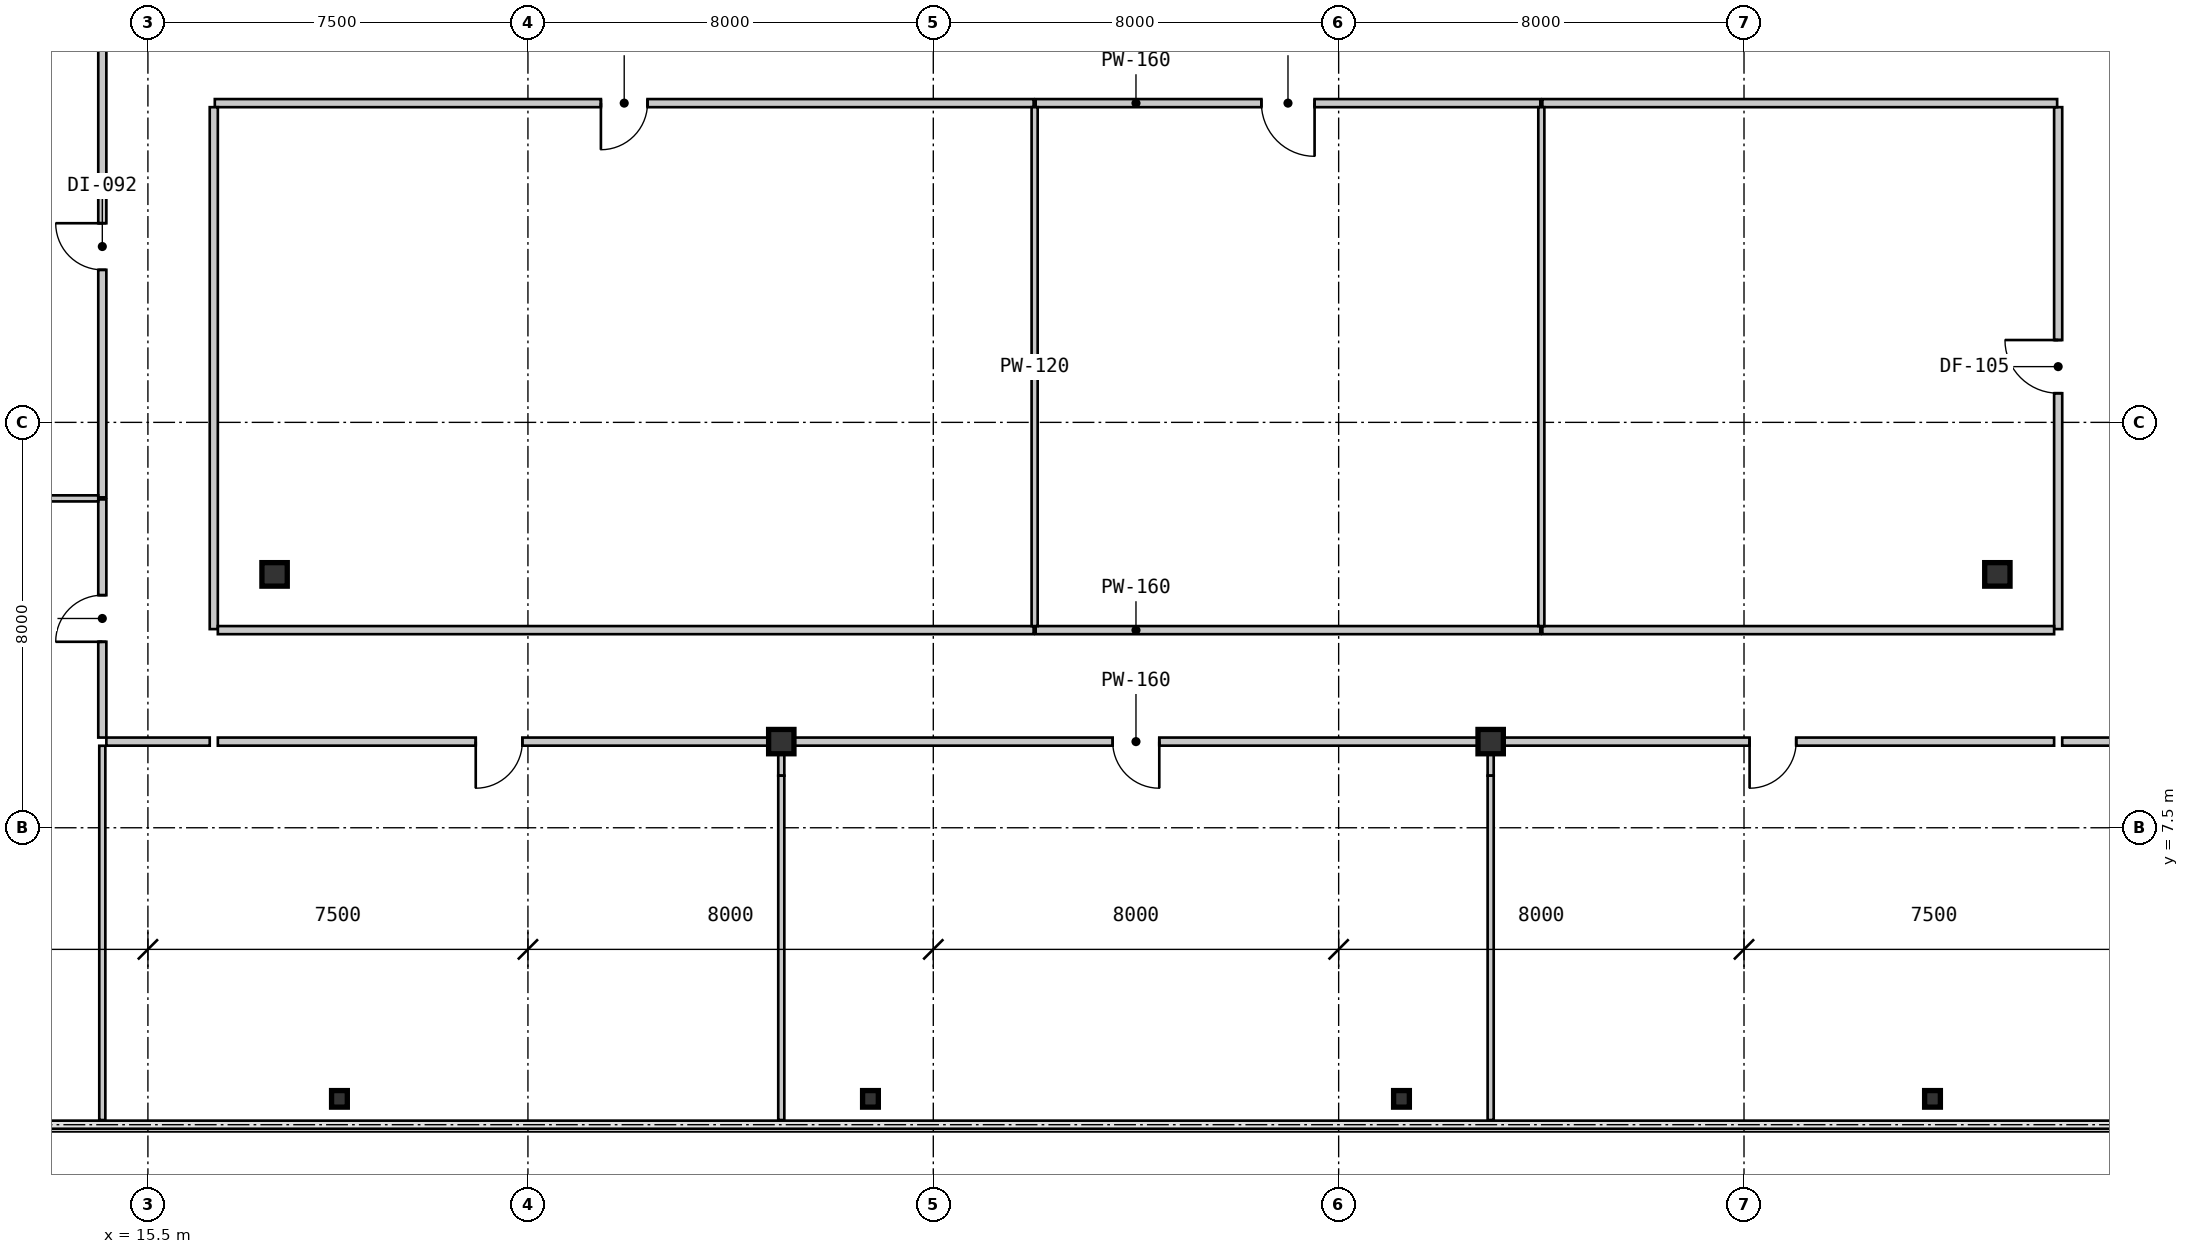
"""IFC4 building model, lengths in metres.
Left out: names, types, materials, properties, quantities, classifications, styles, units other than length and angle.
Written with IfcOpenShell. Run it as: python <this file> out.ifc"""

import sys

from ifc_helpers import new_model, si_unit, direction, frame, frame_2d, origin, origin_2d, place, context, subcontext, project, spatial, rectangle, i_section, extrude, source, transform, mapped, element, fill, save


model = new_model("IFC4")
c1 = context("Model", 3, precision=1e-05, world=origin(), true_north=direction((0.0, 1.0)))
c2 = subcontext(c1, "Body", "Model", "MODEL_VIEW")
j1 = project(units=[si_unit("LENGTHUNIT", "METRE"), si_unit("PLANEANGLEUNIT", "RADIAN")], contexts=[c1])
p1 = place(None, origin())
s1 = spatial("IfcSite", under=j1, at=p1, CompositionType="ELEMENT")
p2 = place(p1, origin())
s2 = spatial("IfcBuilding", under=s1, at=p2, CompositionType="ELEMENT")
p3 = place(p2, frame((0.0, 0.0, 38.85)))
s3 = spatial("IfcBuildingStorey", under=s2, at=p3, CompositionType="ELEMENT", Elevation=38.85)
m1 = source(origin(), c2, "Body", "SweptSolid", [
    extrude(i_section(OverallWidth=0.5, OverallDepth=0.48, WebThickness=0.028, FlangeThickness=0.044, at=origin_2d()), origin(), (0.0, 0.0, 1.0), 3.15),
])
for number, where, z_axis, x_axis in (
    (1, (28.0, 9.2, 0.0), (0.0, 0.0, 1.0), (1.0, 0.0, 0.0)),
    (2, (42.0, 9.2, 0.0), (0.0, 0.0, 1.0), (1.0, 0.0, 0.0)),
):
    element("IfcColumn", number, at=place(p3, frame(where, z_axis=z_axis, x_axis=x_axis)), inside=s3, PredefinedType="COLUMN", context=c2, shape_type="MappedRepresentation", body=[
        mapped(m1, transform((0.0, 0.0, 0.0), scale=1.0)),
    ])
m2 = source(origin(), c2, "Body", "SweptSolid", [
    extrude(i_section(OverallWidth=0.5, OverallDepth=0.464, WebThickness=0.022, FlangeThickness=0.034, at=origin_2d()), origin(), (0.0, 0.0, 1.0), 3.15),
])
for number, where, z_axis, x_axis in (
    (3, (18.0, 12.5, 0.0), (0.0, 0.0, 1.0), (1.0, 0.0, 0.0)),
    (4, (52.0, 12.5, 0.0), (0.0, 0.0, 1.0), (1.0, 0.0, 0.0)),
):
    element("IfcColumn", number, at=place(p3, frame(where, z_axis=z_axis, x_axis=x_axis)), inside=s3, PredefinedType="COLUMN", context=c2, shape_type="MappedRepresentation", body=[
        mapped(m2, transform((0.0, 0.0, 0.0), scale=1.0)),
    ])
m3 = source(origin(), c2, "Body", "SweptSolid", [
    extrude(i_section(OverallWidth=0.311, OverallDepth=0.327, WebThickness=0.016, FlangeThickness=0.025, at=origin_2d()), origin(), (0.0, 0.0, 1.0), 3.15),
])
for number, where, z_axis, x_axis in (
    (5, (19.28, 2.15, 0.0), (0.0, 0.0, 1.0), (1.0, 0.0, 0.0)),
    (6, (29.76, 2.15, 0.0), (0.0, 0.0, 1.0), (1.0, 0.0, 0.0)),
    (7, (40.24, 2.15, 0.0), (0.0, 0.0, 1.0), (1.0, 0.0, 0.0)),
    (8, (50.72, 2.15, 0.0), (0.0, 0.0, 1.0), (1.0, 0.0, 0.0)),
):
    element("IfcColumn", number, at=place(p3, frame(where, z_axis=z_axis, x_axis=x_axis)), inside=s3, PredefinedType="COLUMN", context=c2, shape_type="MappedRepresentation", body=[
        mapped(m3, transform((0.0, 0.0, 0.0), scale=1.0)),
    ])
m4 = source(origin(), c2, "Body", "SweptSolid", [
    extrude(rectangle(XDim=16.159, YDim=0.16, at=frame_2d((8.08, 0.0))), origin(), (0.0, 0.0, 1.0), 2.93),
])
p4 = place(p3, frame((32.98, 21.8, 0.0), z_axis=(0.0, 0.0, 1.0), x_axis=(-1.0, 0.0, 0.0)))
e9 = element("IfcWall", 9, at=p4, inside=s3, PredefinedType="PARTITIONING", context=c2, shape_type="MappedRepresentation", body=[
    mapped(m4, transform((0.0, 0.0, 0.0), scale=1.0)),
])
m5 = source(origin(), c2, "Body", "SweptSolid", [
    extrude(rectangle(XDim=0.92, YDim=2.1, at=frame_2d((0.46, 1.05))), frame((0.0, 0.09, 0.0), z_axis=(0.0, -1.0, 0.0), x_axis=(1.0, 0.0, 0.0)), (0.0, 0.0, 1.0), 0.18),
])
p5 = place(p4, frame((7.62, 0.0, 0.0)))
e10 = element("IfcOpeningElement", 10, at=p5, cuts=e9, PredefinedType="OPENING", context=c2, shape_type="MappedRepresentation", body=[
    mapped(m5, transform((0.0, 0.0, 0.0), scale=1.0)),
])
m6 = source(origin(), c2, "Body", "SweptSolid", [
    extrude(rectangle(XDim=10.3, YDim=0.16, at=frame_2d((5.15, 0.0))), origin(), (0.0, 0.0, 1.0), 2.93),
])
p6 = place(p3, frame((16.8, 21.72, 0.0), z_axis=(0.0, 0.0, 1.0), x_axis=(0.0, -1.0, 0.0)))
e11 = element("IfcWall", 11, at=p6, inside=s3, PredefinedType="PARTITIONING", context=c2, shape_type="MappedRepresentation", body=[
    mapped(m6, transform((0.0, 0.0, 0.0), scale=1.0)),
])
m7 = source(origin(), c2, "Body", "SweptSolid", [
    extrude(rectangle(XDim=9.959, YDim=0.16, at=frame_2d((4.98, 0.0))), origin(), (0.0, 0.0, 1.0), 2.93),
])
p7 = place(p3, frame((42.98, 21.8, 0.0), z_axis=(0.0, 0.0, 1.0), x_axis=(-1.0, 0.0, 0.0)))
e12 = element("IfcWall", 12, at=p7, inside=s3, PredefinedType="PARTITIONING", context=c2, shape_type="MappedRepresentation", body=[
    mapped(m7, transform((0.0, 0.0, 0.0), scale=1.0)),
])
m8 = source(origin(), c2, "Body", "SweptSolid", [
    extrude(rectangle(XDim=1.05, YDim=2.1, at=frame_2d((0.525, 1.05))), frame((0.0, 0.09, 0.0), z_axis=(0.0, -1.0, 0.0), x_axis=(1.0, 0.0, 0.0)), (0.0, 0.0, 1.0), 0.18),
])
p8 = place(p7, frame((4.455, 0.0, 0.0)))
e13 = element("IfcOpeningElement", 13, at=p8, cuts=e12, PredefinedType="OPENING", context=c2, shape_type="MappedRepresentation", body=[
    mapped(m8, transform((0.0, 0.0, 0.0), scale=1.0)),
])
p9 = place(p3, frame((53.2, 11.42, 0.0), z_axis=(0.0, 0.0, 1.0), x_axis=(0.0, 1.0, 0.0)))
e14 = element("IfcWall", 14, at=p9, inside=s3, PredefinedType="PARTITIONING", context=c2, shape_type="MappedRepresentation", body=[
    mapped(m6, transform((0.0, 0.0, 0.0), scale=1.0)),
])
p10 = place(p9, frame((4.655, 0.0, 0.0)))
e15 = element("IfcOpeningElement", 15, at=p10, cuts=e14, PredefinedType="OPENING", context=c2, shape_type="MappedRepresentation", body=[
    mapped(m8, transform((0.0, 0.0, 0.0), scale=1.0)),
])
m9 = source(origin(), c2, "Body", "SweptSolid", [
    extrude(rectangle(XDim=10.159, YDim=0.16, at=frame_2d((5.08, 0.0))), origin(), (0.0, 0.0, 1.0), 2.93),
])
p11 = place(p3, frame((53.18, 21.8, 0.0), z_axis=(0.0, 0.0, 1.0), x_axis=(-1.0, 0.0, 0.0)))
e16 = element("IfcWall", 16, at=p11, inside=s3, PredefinedType="PARTITIONING", context=c2, shape_type="MappedRepresentation", body=[
    mapped(m9, transform((0.0, 0.0, 0.0), scale=1.0)),
])
m10 = source(origin(), c2, "Body", "SweptSolid", [
    extrude(rectangle(XDim=2.04, YDim=0.16, at=frame_2d((1.02, 0.0))), origin(), (0.0, 0.0, 1.0), 2.93),
])
for number, where, z_axis, x_axis in (
    (17, (16.72, 9.2, 0.0), (0.0, 0.0, 1.0), (-1.0, 0.0, 0.0)),
    (18, (55.32, 9.2, 0.0), (0.0, 0.0, 1.0), (-1.0, 0.0, 0.0)),
):
    element("IfcWall", number, at=place(p3, frame(where, z_axis=z_axis, x_axis=x_axis)), inside=s3, PredefinedType="PARTITIONING", context=c2, shape_type="MappedRepresentation", body=[
        mapped(m10, transform((0.0, 0.0, 0.0), scale=1.0)),
    ])
m11 = source(origin(), c2, "Body", "SweptSolid", [
    extrude(rectangle(XDim=4.7, YDim=0.16, at=frame_2d((2.35, 0.0))), origin(), (0.0, 0.0, 1.0), 2.93),
])
p12 = place(p3, frame((14.6, 9.28, 0.0), z_axis=(0.0, 0.0, 1.0), x_axis=(0.0, 1.0, 0.0)))
e19 = element("IfcWall", 19, at=p12, inside=s3, PredefinedType="PARTITIONING", context=c2, shape_type="MappedRepresentation", body=[
    mapped(m11, transform((0.0, 0.0, 0.0), scale=1.0)),
])
p13 = place(p12, frame((1.89, 0.0, 0.0)))
e20 = element("IfcOpeningElement", 20, at=p13, cuts=e19, PredefinedType="OPENING", context=c2, shape_type="MappedRepresentation", body=[
    mapped(m5, transform((0.0, 0.0, 0.0), scale=1.0)),
])
m12 = source(origin(), c2, "Body", "SweptSolid", [
    extrude(rectangle(XDim=9.9, YDim=0.16, at=frame_2d((4.95, 0.0))), origin(), (0.0, 0.0, 1.0), 2.93),
])
p14 = place(p3, frame((14.6, 14.02, 0.0), z_axis=(0.0, 0.0, 1.0), x_axis=(0.0, 1.0, 0.0)))
e21 = element("IfcWall", 21, at=p14, inside=s3, PredefinedType="PARTITIONING", context=c2, shape_type="MappedRepresentation", body=[
    mapped(m12, transform((0.0, 0.0, 0.0), scale=1.0)),
])
p15 = place(p14, frame((4.49, 0.0, 0.0)))
e22 = element("IfcOpeningElement", 22, at=p15, cuts=e21, PredefinedType="OPENING", context=c2, shape_type="MappedRepresentation", body=[
    mapped(m5, transform((0.0, 0.0, 0.0), scale=1.0)),
])
m13 = source(origin(), c2, "Body", "SweptSolid", [
    extrude(rectangle(XDim=16.1, YDim=0.16, at=frame_2d((8.05, 0.0))), origin(), (0.0, 0.0, 1.0), 2.93),
])
p16 = place(p3, frame((16.88, 11.4, 0.0), z_axis=(0.0, 0.0, 1.0), x_axis=(1.0, 0.0, 0.0)))
e23 = element("IfcWall", 23, at=p16, inside=s3, PredefinedType="PARTITIONING", context=c2, shape_type="MappedRepresentation", body=[
    mapped(m13, transform((0.0, 0.0, 0.0), scale=1.0)),
])
p17 = place(p3, frame((33.02, 11.4, 0.0), z_axis=(0.0, 0.0, 1.0), x_axis=(1.0, 0.0, 0.0)))
e24 = element("IfcWall", 24, at=p17, inside=s3, PredefinedType="PARTITIONING", context=c2, shape_type="MappedRepresentation", body=[
    mapped(m7, transform((0.0, 0.0, 0.0), scale=1.0)),
])
m14 = source(origin(), c2, "Body", "SweptSolid", [
    extrude(rectangle(XDim=10.1, YDim=0.16, at=frame_2d((5.05, 0.0))), origin(), (0.0, 0.0, 1.0), 2.93),
])
p18 = place(p3, frame((43.02, 11.4, 0.0), z_axis=(0.0, 0.0, 1.0), x_axis=(1.0, 0.0, 0.0)))
e25 = element("IfcWall", 25, at=p18, inside=s3, PredefinedType="PARTITIONING", context=c2, shape_type="MappedRepresentation", body=[
    mapped(m14, transform((0.0, 0.0, 0.0), scale=1.0)),
])
m15 = source(origin(), c2, "Body", "SweptSolid", [
    extrude(rectangle(XDim=11.1, YDim=0.16, at=frame_2d((5.55, 0.0))), origin(), (0.0, 0.0, 1.0), 2.93),
])
p19 = place(p3, frame((27.98, 9.2, 0.0), z_axis=(0.0, 0.0, 1.0), x_axis=(-1.0, 0.0, 0.0)))
e26 = element("IfcWall", 26, at=p19, inside=s3, PredefinedType="PARTITIONING", context=c2, shape_type="MappedRepresentation", body=[
    mapped(m15, transform((0.0, 0.0, 0.0), scale=1.0)),
])
p20 = place(p19, frame((5.09, 0.0, 0.0)))
e27 = element("IfcOpeningElement", 27, at=p20, cuts=e26, PredefinedType="OPENING", context=c2, shape_type="MappedRepresentation", body=[
    mapped(m5, transform((0.0, 0.0, 0.0), scale=1.0)),
])
m16 = source(origin(), c2, "Body", "SweptSolid", [
    extrude(rectangle(XDim=13.959, YDim=0.16, at=frame_2d((6.98, 0.0))), origin(), (0.0, 0.0, 1.0), 2.328),
])
p21 = place(p3, frame((41.98, 9.2, 0.0), z_axis=(0.0, 0.0, 1.0), x_axis=(-1.0, 0.0, 0.0)))
e28 = element("IfcWall", 28, at=p21, inside=s3, PredefinedType="PARTITIONING", context=c2, shape_type="MappedRepresentation", body=[
    mapped(m16, transform((0.0, 0.0, 0.0), scale=1.0)),
])
p22 = place(p21, frame((6.52, 0.0, 0.0)))
e29 = element("IfcOpeningElement", 29, at=p22, cuts=e28, PredefinedType="OPENING", context=c2, shape_type="MappedRepresentation", body=[
    mapped(m5, transform((0.0, 0.0, 0.0), scale=1.0)),
])
p23 = place(p3, frame((53.12, 9.2, 0.0), z_axis=(0.0, 0.0, 1.0), x_axis=(-1.0, 0.0, 0.0)))
e30 = element("IfcWall", 30, at=p23, inside=s3, PredefinedType="PARTITIONING", context=c2, shape_type="MappedRepresentation", body=[
    mapped(m15, transform((0.0, 0.0, 0.0), scale=1.0)),
])
p24 = place(p23, frame((5.09, 0.0, 0.0)))
e31 = element("IfcOpeningElement", 31, at=p24, cuts=e30, PredefinedType="OPENING", context=c2, shape_type="MappedRepresentation", body=[
    mapped(m5, transform((0.0, 0.0, 0.0), scale=1.0)),
])
m17 = source(origin(), c2, "Body", "SweptSolid", [
    extrude(rectangle(XDim=10.24, YDim=0.12, at=frame_2d((5.12, 0.0))), origin(), (0.0, 0.0, 1.0), 2.93),
])
for number, where, z_axis, x_axis in (
    (32, (33.0, 21.72, 0.0), (0.0, 0.0, 1.0), (0.0, -1.0, 0.0)),
    (33, (43.0, 21.72, 0.0), (0.0, 0.0, 1.0), (0.0, -1.0, 0.0)),
):
    element("IfcWall", number, at=place(p3, frame(where, z_axis=z_axis, x_axis=x_axis)), inside=s3, PredefinedType="PARTITIONING", context=c2, shape_type="MappedRepresentation", body=[
        mapped(m17, transform((0.0, 0.0, 0.0), scale=1.0)),
    ])
m18 = source(origin(), c2, "Body", "SweptSolid", [
    extrude(rectangle(XDim=0.59, YDim=0.12, at=frame_2d((0.295, 0.0))), origin(), (0.0, 0.0, 1.0), 2.397),
])
p25 = place(p3, frame((28.0, 9.118, 0.0), z_axis=(0.0, 0.0, 1.0), x_axis=(0.0, -1.0, 0.0)))
e34 = element("IfcWall", 34, at=p25, inside=s3, PredefinedType="PARTITIONING", context=c2, shape_type="MappedRepresentation", body=[
    mapped(m18, transform((0.0, 0.0, 0.0), scale=1.0)),
])
m19 = source(origin(), c2, "Body", "SweptSolid", [
    extrude(rectangle(XDim=6.796, YDim=0.12, at=frame_2d((3.398, 0.0))), origin(), (0.0, 0.0, 1.0), 2.93),
])
p26 = place(p3, frame((28.0, 8.528, 0.0), z_axis=(0.0, 0.0, 1.0), x_axis=(0.0, -1.0, 0.0)))
e35 = element("IfcWall", 35, at=p26, inside=s3, PredefinedType="PARTITIONING", context=c2, shape_type="MappedRepresentation", body=[
    mapped(m19, transform((0.0, 0.0, 0.0), scale=1.0)),
])
m20 = source(origin(), c2, "Body", "SweptSolid", [
    extrude(rectangle(XDim=7.386, YDim=0.12, at=frame_2d((3.693, 0.0))), origin(), (0.0, 0.0, 1.0), 2.93),
])
p27 = place(p3, frame((14.6, 1.732, 0.0), z_axis=(0.0, 0.0, 1.0), x_axis=(0.0, 1.0, 0.0)))
e36 = element("IfcWall", 36, at=p27, inside=s3, PredefinedType="PARTITIONING", context=c2, shape_type="MappedRepresentation", body=[
    mapped(m20, transform((0.0, 0.0, 0.0), scale=1.0)),
])
p28 = place(p3, frame((42.0, 9.118, 0.0), z_axis=(0.0, 0.0, 1.0), x_axis=(0.0, -1.0, 0.0)))
e37 = element("IfcWall", 37, at=p28, inside=s3, PredefinedType="PARTITIONING", context=c2, shape_type="MappedRepresentation", body=[
    mapped(m18, transform((0.0, 0.0, 0.0), scale=1.0)),
])
p29 = place(p3, frame((42.0, 8.528, 0.0), z_axis=(0.0, 0.0, 1.0), x_axis=(0.0, -1.0, 0.0)))
e38 = element("IfcWall", 38, at=p29, inside=s3, PredefinedType="PARTITIONING", context=c2, shape_type="MappedRepresentation", body=[
    mapped(m19, transform((0.0, 0.0, 0.0), scale=1.0)),
])
m21 = source(origin(), c2, "Body", "SweptSolid", [
    extrude(rectangle(XDim=9.29, YDim=0.12, at=frame_2d((4.645, 0.0))), origin(), (0.0, 0.0, 1.0), 2.93),
])
p30 = place(p3, frame((5.23, 14.0, 0.0), z_axis=(0.0, 0.0, 1.0), x_axis=(1.0, 0.0, 0.0)))
e39 = element("IfcWall", 39, at=p30, inside=s3, PredefinedType="PARTITIONING", context=c2, shape_type="MappedRepresentation", body=[
    mapped(m21, transform((0.0, 0.0, 0.0), scale=1.0)),
])
m22 = source(origin(), c2, "Body", "SweptSolid", [
    extrude(rectangle(XDim=0.92, YDim=2.1, at=frame_2d((0.46, 1.05))), frame((0.0, 0.025, 0.0), z_axis=(0.0, -1.0, 0.0), x_axis=(1.0, 0.0, 0.0)), (0.0, 0.0, 1.0), 0.05),
])
p31 = place(p5, origin())
e40 = element("IfcDoor", 40, at=p31, inside=s3, OperationType="SINGLE_SWING_RIGHT", PredefinedType="DOOR", context=c2, shape_type="MappedRepresentation", body=[
    mapped(m22, transform((0.0, 0.0, 0.0), scale=1.0)),
])
fill(e10, e40)
m23 = source(origin(), c2, "Body", "SweptSolid", [
    extrude(rectangle(XDim=1.05, YDim=2.1, at=frame_2d((0.525, 1.05))), frame((0.0, 0.025, 0.0), z_axis=(0.0, -1.0, 0.0), x_axis=(1.0, 0.0, 0.0)), (0.0, 0.0, 1.0), 0.05),
])
p32 = place(p8, origin())
e41 = element("IfcDoor", 41, at=p32, inside=s3, OperationType="SINGLE_SWING_LEFT", PredefinedType="DOOR", context=c2, shape_type="MappedRepresentation", body=[
    mapped(m23, transform((0.0, 0.0, 0.0), scale=1.0)),
])
fill(e13, e41)
p33 = place(p10, origin())
e42 = element("IfcDoor", 42, at=p33, inside=s3, OperationType="SINGLE_SWING_RIGHT", PredefinedType="DOOR", context=c2, shape_type="MappedRepresentation", body=[
    mapped(m23, transform((0.0, 0.0, 0.0), scale=1.0)),
])
fill(e15, e42)
p34 = place(p13, origin())
e43 = element("IfcDoor", 43, at=p34, inside=s3, OperationType="SINGLE_SWING_LEFT", PredefinedType="DOOR", context=c2, shape_type="MappedRepresentation", body=[
    mapped(m22, transform((0.0, 0.0, 0.0), scale=1.0)),
])
fill(e20, e43)
p35 = place(p15, origin())
e44 = element("IfcDoor", 44, at=p35, inside=s3, OperationType="SINGLE_SWING_RIGHT", PredefinedType="DOOR", context=c2, shape_type="MappedRepresentation", body=[
    mapped(m22, transform((0.0, 0.0, 0.0), scale=1.0)),
])
fill(e22, e44)
p36 = place(p20, origin())
e45 = element("IfcDoor", 45, at=p36, inside=s3, OperationType="SINGLE_SWING_RIGHT", PredefinedType="DOOR", context=c2, shape_type="MappedRepresentation", body=[
    mapped(m22, transform((0.0, 0.0, 0.0), scale=1.0)),
])
fill(e27, e45)
p37 = place(p22, origin())
e46 = element("IfcDoor", 46, at=p37, inside=s3, OperationType="SINGLE_SWING_LEFT", PredefinedType="DOOR", context=c2, shape_type="MappedRepresentation", body=[
    mapped(m22, transform((0.0, 0.0, 0.0), scale=1.0)),
])
fill(e29, e46)
p38 = place(p24, origin())
e47 = element("IfcDoor", 47, at=p38, inside=s3, OperationType="SINGLE_SWING_RIGHT", PredefinedType="DOOR", context=c2, shape_type="MappedRepresentation", body=[
    mapped(m22, transform((0.0, 0.0, 0.0), scale=1.0)),
])
fill(e31, e47)
save(model, sys.argv[1])
